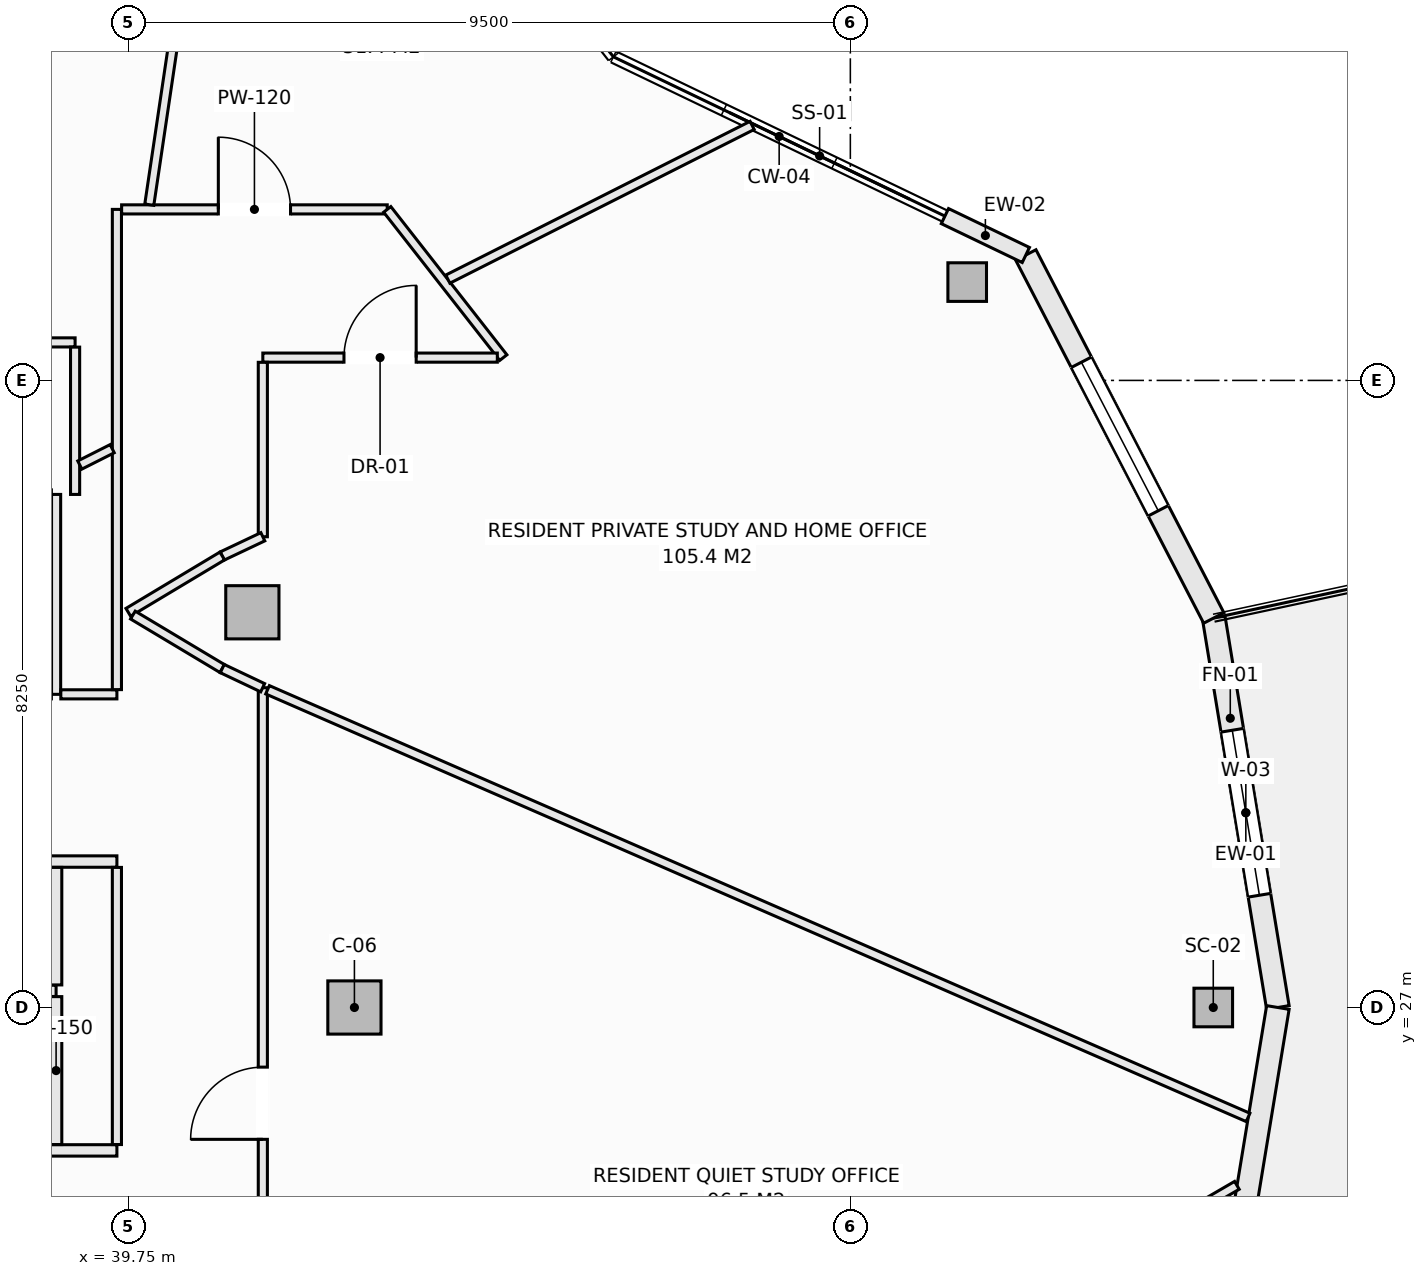
"""IFC4 building model, lengths in metres.
Left out: names, types, materials, properties, quantities, classifications, styles, units other than length and angle.
Written with IfcOpenShell. Run it as: python <this file> out.ifc"""

import sys

from ifc_helpers import new_model, si_unit, direction, frame, frame_2d, origin, origin_2d, place, context, subcontext, project, spatial, rectangle, hollow_rectangle, extrude, element, fill, save


model = new_model("IFC4")
c1 = context("Model", 3, precision=1e-05, world=origin(), true_north=direction((0.0, 1.0)))
c2 = subcontext(c1, "Body", "Model", "MODEL_VIEW")
j1 = project(units=[si_unit("LENGTHUNIT", "METRE"), si_unit("PLANEANGLEUNIT", "RADIAN")], contexts=[c1])
p1 = place(None, origin())
s1 = spatial("IfcSite", under=j1, at=p1, CompositionType="ELEMENT")
p2 = place(p1, origin())
s2 = spatial("IfcBuilding", under=s1, at=p2, CompositionType="ELEMENT")
p3 = place(p2, frame((0.0, 0.0, 226.1)))
s3 = spatial("IfcBuildingStorey", under=s2, at=p3, CompositionType="ELEMENT", Elevation=226.1)
for number, where, z_axis, x_axis in (
    (1, (54.025, 27.0, -0.27), (0.0, 0.0, 1.0), (1.0, 0.0, 0.0)),
    (2, (50.787, 36.544, -0.27), (0.0, 0.0, 1.0), (1.0, 0.0, 0.0)),
):
    element("IfcColumn", number, at=place(p3, frame(where, z_axis=z_axis, x_axis=x_axis)), inside=s3, PredefinedType="COLUMN", context=c2, shape_type="SweptSolid", body=[
        extrude(hollow_rectangle(XDim=0.508, YDim=0.508, WallThickness=0.019, at=origin_2d()), origin(), (0.0, 0.0, 1.0), 3.3),
    ])
for number, where, z_axis, x_axis in (
    (3, (42.725, 27.0, -0.27), (0.0, 0.0, 1.0), (1.0, 0.0, 0.0)),
    (4, (41.382, 32.199, -0.27), (0.0, 0.0, 1.0), (1.0, 0.0, 0.0)),
):
    element("IfcColumn", number, at=place(p3, frame(where, z_axis=z_axis, x_axis=x_axis)), inside=s3, PredefinedType="COLUMN", context=c2, shape_type="SweptSolid", body=[
        extrude(rectangle(XDim=0.7, YDim=0.7, at=origin_2d()), origin(), (0.0, 0.0, 1.0), 3.3),
    ])
p4 = place(p3, frame((54.032, 32.125, 0.0), z_axis=(0.0, 0.0, 1.0), x_axis=(0.16237087798, -0.986729799886, 0.0)))
e5 = element("IfcWall", 5, at=p4, inside=s3, PredefinedType="SOLIDWALL", context=c2, shape_type="SweptSolid", body=[
    extrude(rectangle(XDim=5.193, YDim=0.3, at=frame_2d((2.597, 0.0))), origin(), (0.0, 0.0, 1.0), 2.605),
])
p5 = place(p4, frame((1.497, 0.0, 0.72)))
e6 = element("IfcOpeningElement", 6, at=p5, cuts=e5, PredefinedType="OPENING", context=c2, shape_type="SweptSolid", body=[
    extrude(rectangle(XDim=2.2, YDim=1.65, at=frame_2d((1.1, 0.825))), frame((0.0, 0.16, 0.0), z_axis=(0.0, -1.0, 0.0), x_axis=(1.0, 0.0, 0.0)), (0.0, 0.0, 1.0), 0.32),
])
p6 = place(p3, frame((51.559, 36.9, 0.0), z_axis=(0.0, 0.0, 1.0), x_axis=(0.459808219482, -0.888018243786, 0.0)))
e7 = element("IfcWall", 7, at=p6, inside=s3, PredefinedType="SOLIDWALL", context=c2, shape_type="SweptSolid", body=[
    extrude(rectangle(XDim=5.378, YDim=0.3, at=frame_2d((2.689, 0.0))), origin(), (0.0, 0.0, 1.0), 2.605),
])
p7 = place(p6, frame((1.589, 0.0, 0.72)))
e8 = element("IfcOpeningElement", 8, at=p7, cuts=e7, PredefinedType="OPENING", context=c2, shape_type="SweptSolid", body=[
    extrude(rectangle(XDim=2.2, YDim=1.65, at=frame_2d((1.1, 0.825))), frame((0.0, 0.16, 0.0), z_axis=(0.0, -1.0, 0.0), x_axis=(1.0, 0.0, 0.0)), (0.0, 0.0, 1.0), 0.32),
])
p8 = place(p3, frame((50.494, 37.412, 0.0), z_axis=(0.0, 0.0, 1.0), x_axis=(0.901342408365, -0.433107218692, 0.0)))
e9 = element("IfcWall", 9, at=p8, inside=s3, PredefinedType="SOLIDWALL", context=c2, shape_type="SweptSolid", body=[
    extrude(rectangle(XDim=1.181, YDim=0.22, at=frame_2d((0.591, 0.0))), origin(), (0.0, 0.0, 1.0), 2.605),
])
p9 = place(p3, frame((54.032, 21.875, 0.0), z_axis=(0.0, 0.0, 1.0), x_axis=(0.16237087798, 0.986729799886, 0.0)))
e10 = element("IfcWall", 10, at=p9, inside=s3, PredefinedType="SOLIDWALL", context=c2, shape_type="SweptSolid", body=[
    extrude(rectangle(XDim=5.193, YDim=0.3, at=frame_2d((2.597, 0.0))), origin(), (0.0, 0.0, 1.0), 2.605),
])
p10 = place(p9, frame((0.5, 0.0, 0.0)))
e11 = element("IfcOpeningElement", 11, at=p10, cuts=e10, PredefinedType="OPENING", context=c2, shape_type="SweptSolid", body=[
    extrude(rectangle(XDim=1.2, YDim=2.2, at=frame_2d((0.6, 1.1))), frame((0.0, 0.16, 0.0), z_axis=(0.0, -1.0, 0.0), x_axis=(1.0, 0.0, 0.0)), (0.0, 0.0, 1.0), 0.32),
])
p11 = place(p3, frame((30.077, 28.92, 0.0), z_axis=(0.0, 0.0, 1.0), x_axis=(1.0, 0.0, 0.0)))
e12 = element("IfcWall", 12, at=p11, inside=s3, PredefinedType="PARTITIONING", context=c2, shape_type="SweptSolid", body=[
    extrude(rectangle(XDim=9.523, YDim=0.15, at=frame_2d((4.762, 0.0))), origin(), (0.0, 0.0, 1.0), 3.03),
])
p12 = place(p11, frame((1.342, 0.0, 0.0)))
e13 = element("IfcOpeningElement", 13, at=p12, cuts=e12, PredefinedType="OPENING", context=c2, shape_type="SweptSolid", body=[
    extrude(rectangle(XDim=0.95, YDim=2.1, at=frame_2d((0.475, 1.05))), frame((0.0, 0.085, 0.0), z_axis=(0.0, -1.0, 0.0), x_axis=(1.0, 0.0, 0.0)), (0.0, 0.0, 1.0), 0.17),
])
p13 = place(p11, frame((5.498, 0.0, 0.0)))
e14 = element("IfcOpeningElement", 14, at=p13, cuts=e12, PredefinedType="OPENING", context=c2, shape_type="SweptSolid", body=[
    extrude(rectangle(XDim=0.95, YDim=2.1, at=frame_2d((0.475, 1.05))), frame((0.0, 0.085, 0.0), z_axis=(0.0, -1.0, 0.0), x_axis=(1.0, 0.0, 0.0)), (0.0, 0.0, 1.0), 0.17),
])
p14 = place(p3, frame((33.377, 25.12, 0.0), z_axis=(0.0, 0.0, 1.0), x_axis=(1.0, 0.0, 0.0)))
e15 = element("IfcWall", 15, at=p14, inside=s3, PredefinedType="PARTITIONING", context=c2, shape_type="SweptSolid", body=[
    extrude(rectangle(XDim=6.223, YDim=0.15, at=frame_2d((3.112, 0.0))), origin(), (0.0, 0.0, 1.0), 3.03),
])
p15 = place(p14, frame((2.441, 0.0, 0.0)))
e16 = element("IfcOpeningElement", 16, at=p15, cuts=e15, PredefinedType="OPENING", context=c2, shape_type="SweptSolid", body=[
    extrude(rectangle(XDim=0.95, YDim=2.1, at=frame_2d((0.475, 1.05))), frame((0.0, 0.085, 0.0), z_axis=(0.0, -1.0, 0.0), x_axis=(1.0, 0.0, 0.0)), (0.0, 0.0, 1.0), 0.17),
])
p16 = place(p3, frame((33.377, 27.22, 0.0), z_axis=(0.0, 0.0, 1.0), x_axis=(1.0, 0.0, 0.0)))
e17 = element("IfcWall", 17, at=p16, inside=s3, PredefinedType="PARTITIONING", context=c2, shape_type="SweptSolid", body=[
    extrude(rectangle(XDim=5.423, YDim=0.15, at=frame_2d((2.711, 0.0))), origin(), (0.0, 0.0, 1.0), 3.03),
])
p17 = place(p3, frame((38.8, 25.197, 0.0), z_axis=(0.0, 0.0, 1.0), x_axis=(0.0, 1.0, 0.0)))
e18 = element("IfcWall", 18, at=p17, inside=s3, PredefinedType="PARTITIONING", context=c2, shape_type="SweptSolid", body=[
    extrude(rectangle(XDim=1.946, YDim=0.15, at=frame_2d((0.973, 0.0))), origin(), (0.0, 0.0, 1.0), 3.03),
])
p18 = place(p3, frame((38.8, 27.297, 0.0), z_axis=(0.0, 0.0, 1.0), x_axis=(0.0, 1.0, 0.0)))
e19 = element("IfcWall", 19, at=p18, inside=s3, PredefinedType="PARTITIONING", context=c2, shape_type="SweptSolid", body=[
    extrude(rectangle(XDim=1.546, YDim=0.15, at=frame_2d((0.773, 0.0))), origin(), (0.0, 0.0, 1.0), 3.03),
])
p19 = place(p3, frame((38.8, 31.12, 0.0), z_axis=(0.0, 0.0, 1.0), x_axis=(0.0, 1.0, 0.0)))
e20 = element("IfcWall", 20, at=p19, inside=s3, PredefinedType="PARTITIONING", context=c2, shape_type="SweptSolid", body=[
    extrude(rectangle(XDim=2.63, YDim=0.12, at=frame_2d((1.315, 0.0))), origin(), (0.0, 0.0, 1.0), 3.03),
])
p20 = place(p3, frame((38.862, 31.12, 0.0), z_axis=(0.0, 0.0, 1.0), x_axis=(1.0, 0.0, 0.0)))
e21 = element("IfcWall", 21, at=p20, inside=s3, PredefinedType="PARTITIONING", context=c2, shape_type="SweptSolid", body=[
    extrude(rectangle(XDim=0.738, YDim=0.12, at=frame_2d((0.369, 0.0))), origin(), (0.0, 0.0, 1.0), 3.03),
])
p21 = place(p3, frame((34.025, 35.75, 0.0), z_axis=(0.0, 0.0, 1.0), x_axis=(1.0, 0.0, 0.0)))
e22 = element("IfcWall", 22, at=p21, inside=s3, PredefinedType="PARTITIONING", context=c2, shape_type="SweptSolid", body=[
    extrude(rectangle(XDim=5.025, YDim=0.12, at=frame_2d((2.513, 0.0))), origin(), (0.0, 0.0, 1.0), 2.478),
])
p22 = place(p21, frame((1.617, 0.0, 0.0)))
e23 = element("IfcOpeningElement", 23, at=p22, cuts=e22, PredefinedType="OPENING", context=c2, shape_type="SweptSolid", body=[
    extrude(rectangle(XDim=0.95, YDim=2.1, at=frame_2d((0.475, 1.05))), frame((0.0, 0.07, 0.0), z_axis=(0.0, -1.0, 0.0), x_axis=(1.0, 0.0, 0.0)), (0.0, 0.0, 1.0), 0.14),
])
p23 = place(p3, frame((39.05, 33.75, 0.0), z_axis=(0.0, 0.0, 1.0), x_axis=(0.0, 1.0, 0.0)))
e24 = element("IfcWall", 24, at=p23, inside=s3, PredefinedType="PARTITIONING", context=c2, shape_type="SweptSolid", body=[
    extrude(rectangle(XDim=1.938, YDim=0.12, at=frame_2d((0.969, 0.0))), origin(), (0.0, 0.0, 1.0), 3.03),
])
p24 = place(p3, frame((39.6, 25.197, 0.0), z_axis=(0.0, 0.0, 1.0), x_axis=(0.0, 1.0, 0.0)))
e25 = element("IfcWall", 25, at=p24, inside=s3, PredefinedType="PARTITIONING", context=c2, shape_type="SweptSolid", body=[
    extrude(rectangle(XDim=3.646, YDim=0.12, at=frame_2d((1.823, 0.0))), origin(), (0.0, 0.0, 1.0), 3.03),
])
p25 = place(p3, frame((39.6, 31.182, 0.0), z_axis=(0.0, 0.0, 1.0), x_axis=(0.0, 1.0, 0.0)))
e26 = element("IfcWall", 26, at=p25, inside=s3, PredefinedType="PARTITIONING", context=c2, shape_type="SweptSolid", body=[
    extrude(rectangle(XDim=6.318, YDim=0.12, at=frame_2d((3.159, 0.0))), origin(), (0.0, 0.0, 1.0), 3.03),
])
p26 = place(p3, frame((39.662, 37.5, 0.0), z_axis=(0.0, 0.0, 1.0), x_axis=(1.0, 0.0, 0.0)))
e27 = element("IfcWall", 27, at=p26, inside=s3, PredefinedType="PARTITIONING", context=c2, shape_type="SweptSolid", body=[
    extrude(rectangle(XDim=3.495, YDim=0.12, at=frame_2d((1.748, 0.0))), origin(), (0.0, 0.0, 1.0), 2.77),
])
p27 = place(p26, frame((1.272, 0.0, 0.0)))
e28 = element("IfcOpeningElement", 28, at=p27, cuts=e27, PredefinedType="OPENING", context=c2, shape_type="SweptSolid", body=[
    extrude(rectangle(XDim=0.95, YDim=2.1, at=frame_2d((0.475, 1.05))), frame((0.0, 0.07, 0.0), z_axis=(0.0, -1.0, 0.0), x_axis=(1.0, 0.0, 0.0)), (0.0, 0.0, 1.0), 0.14),
])
p28 = place(p3, frame((43.157, 37.5, 0.0), z_axis=(0.0, 0.0, 1.0), x_axis=(0.616571357052, -0.78729902938, 0.0)))
e29 = element("IfcWall", 29, at=p28, inside=s3, PredefinedType="PARTITIONING", context=c2, shape_type="SweptSolid", body=[
    extrude(rectangle(XDim=2.477, YDim=0.12, at=frame_2d((1.238, 0.0))), origin(), (0.0, 0.0, 1.0), 3.03),
])
p29 = place(p3, frame((41.52, 35.55, 0.0), z_axis=(0.0, 0.0, 1.0), x_axis=(1.0, 0.0, 0.0)))
e30 = element("IfcWall", 30, at=p29, inside=s3, PredefinedType="PARTITIONING", context=c2, shape_type="SweptSolid", body=[
    extrude(rectangle(XDim=3.085, YDim=0.12, at=frame_2d((1.542, 0.0))), origin(), (0.0, 0.0, 1.0), 3.03),
])
p30 = place(p29, frame((1.068, 0.0, 0.0)))
e31 = element("IfcOpeningElement", 31, at=p30, cuts=e30, PredefinedType="OPENING", context=c2, shape_type="SweptSolid", body=[
    extrude(rectangle(XDim=0.95, YDim=2.1, at=frame_2d((0.475, 1.05))), frame((0.0, 0.07, 0.0), z_axis=(0.0, -1.0, 0.0), x_axis=(1.0, 0.0, 0.0)), (0.0, 0.0, 1.0), 0.14),
])
p31 = place(p3, frame((41.52, 22.794, 0.0), z_axis=(0.0, 0.0, 1.0), x_axis=(0.0, 1.0, 0.0)))
e32 = element("IfcWall", 32, at=p31, inside=s3, PredefinedType="PARTITIONING", context=c2, shape_type="SweptSolid", body=[
    extrude(rectangle(XDim=8.413, YDim=0.12, at=frame_2d((4.207, 0.0))), origin(), (0.0, 0.0, 1.0), 2.478),
])
p32 = place(p31, frame((2.471, 0.0, 0.0)))
e33 = element("IfcOpeningElement", 33, at=p32, cuts=e32, PredefinedType="OPENING", context=c2, shape_type="SweptSolid", body=[
    extrude(rectangle(XDim=0.95, YDim=2.1, at=frame_2d((0.475, 1.05))), frame((0.0, 0.07, 0.0), z_axis=(0.0, -1.0, 0.0), x_axis=(1.0, 0.0, 0.0)), (0.0, 0.0, 1.0), 0.14),
])
p33 = place(p3, frame((41.52, 33.193, 0.0), z_axis=(0.0, 0.0, 1.0), x_axis=(0.0, 1.0, 0.0)))
e34 = element("IfcWall", 34, at=p33, inside=s3, PredefinedType="PARTITIONING", context=c2, shape_type="SweptSolid", body=[
    extrude(rectangle(XDim=2.295, YDim=0.12, at=frame_2d((1.147, 0.0))), origin(), (0.0, 0.0, 1.0), 3.03),
])
p34 = place(p3, frame((40.986, 32.94, 0.0), z_axis=(0.0, 0.0, 1.0), x_axis=(0.90356951601, 0.428441512621, 0.0)))
e35 = element("IfcWall", 35, at=p34, inside=s3, PredefinedType="PARTITIONING", context=c2, shape_type="SweptSolid", body=[
    extrude(rectangle(XDim=0.591, YDim=0.12, at=frame_2d((0.295, 0.0))), origin(), (0.0, 0.0, 1.0), 3.03),
])
p35 = place(p3, frame((39.75, 32.199, 0.0), z_axis=(0.0, 0.0, 1.0), x_axis=(0.857702120906, 0.514146935996, 0.0)))
e36 = element("IfcWall", 36, at=p35, inside=s3, PredefinedType="PARTITIONING", context=c2, shape_type="SweptSolid", body=[
    extrude(rectangle(XDim=1.441, YDim=0.12, at=frame_2d((0.721, 0.0))), origin(), (0.0, 0.0, 1.0), 3.03),
])
p36 = place(p3, frame((39.81, 32.163, 0.0), z_axis=(0.0, 0.0, 1.0), x_axis=(0.858011245414, -0.513630901273, 0.0)))
e37 = element("IfcWall", 37, at=p36, inside=s3, PredefinedType="PARTITIONING", context=c2, shape_type="SweptSolid", body=[
    extrude(rectangle(XDim=1.37, YDim=0.12, at=frame_2d((0.685, 0.0))), origin(), (0.0, 0.0, 1.0), 3.03),
])
p37 = place(p3, frame((40.986, 31.459, 0.0), z_axis=(0.0, 0.0, 1.0), x_axis=(0.903687141457, -0.428193356283, 0.0)))
e38 = element("IfcWall", 38, at=p37, inside=s3, PredefinedType="PARTITIONING", context=c2, shape_type="SweptSolid", body=[
    extrude(rectangle(XDim=0.588, YDim=0.12, at=frame_2d((0.294, 0.0))), origin(), (0.0, 0.0, 1.0), 3.03),
])
p38 = place(p3, frame((43.773, 18.512, 0.0), z_axis=(0.0, 0.0, 1.0), x_axis=(0.864261022419, 0.503043621495, 0.0)))
e39 = element("IfcWall", 39, at=p38, inside=s3, PredefinedType="PARTITIONING", context=c2, shape_type="SweptSolid", body=[
    extrude(rectangle(XDim=12.222, YDim=0.12, at=frame_2d((6.111, 0.0))), origin(), (0.0, 0.0, 1.0), 3.03),
])
p39 = place(p3, frame((41.582, 31.18, 0.0), z_axis=(0.0, 0.0, 1.0), x_axis=(0.916624100851, -0.399750244202, 0.0)))
e40 = element("IfcWall", 40, at=p39, inside=s3, PredefinedType="PARTITIONING", context=c2, shape_type="SweptSolid", body=[
    extrude(rectangle(XDim=14.074, YDim=0.12, at=frame_2d((7.037, 0.0))), origin(), (0.0, 0.0, 1.0), 2.478),
])
p40 = place(p3, frame((39.112, 34.137, 0.0), z_axis=(0.0, 0.0, 1.0), x_axis=(0.892681104984, 0.450688855869, 0.0)))
e41 = element("IfcWall", 41, at=p40, inside=s3, PredefinedType="PARTITIONING", context=c2, shape_type="SweptSolid", body=[
    extrude(rectangle(XDim=0.477, YDim=0.12, at=frame_2d((0.239, 0.0))), origin(), (0.0, 0.0, 1.0), 3.03),
])
p41 = place(p3, frame((43.954, 36.583, 0.0), z_axis=(0.0, 0.0, 1.0), x_axis=(0.892601830049, 0.450845841716, 0.0)))
e42 = element("IfcWall", 42, at=p41, inside=s3, PredefinedType="PARTITIONING", context=c2, shape_type="SweptSolid", body=[
    extrude(rectangle(XDim=4.485, YDim=0.12, at=frame_2d((2.243, 0.0))), origin(), (0.0, 0.0, 1.0), 3.03),
])
p42 = place(p3, frame((40.026, 37.562, 0.0), z_axis=(0.0, 0.0, 1.0), x_axis=(0.147138038827, 0.989115967685, 0.0)))
e43 = element("IfcWall", 43, at=p42, inside=s3, PredefinedType="PARTITIONING", context=c2, shape_type="SweptSolid", body=[
    extrude(rectangle(XDim=6.98, YDim=0.12, at=frame_2d((3.49, 0.0))), origin(), (0.0, 0.0, 1.0), 2.478),
])
p43 = place(p5, origin())
e44 = element("IfcWindow", 44, at=p43, inside=s3, PartitioningType="SINGLE_PANEL", PredefinedType="WINDOW", context=c2, shape_type="SweptSolid", body=[
    extrude(rectangle(XDim=2.2, YDim=1.65, at=frame_2d((1.1, 0.825))), frame((0.0, 0.03, 0.0), z_axis=(0.0, -1.0, 0.0), x_axis=(1.0, 0.0, 0.0)), (0.0, 0.0, 1.0), 0.06),
])
fill(e6, e44)
p44 = place(p7, origin())
e45 = element("IfcWindow", 45, at=p44, inside=s3, PartitioningType="SINGLE_PANEL", PredefinedType="WINDOW", context=c2, shape_type="SweptSolid", body=[
    extrude(rectangle(XDim=2.2, YDim=1.65, at=frame_2d((1.1, 0.825))), frame((0.0, 0.03, 0.0), z_axis=(0.0, -1.0, 0.0), x_axis=(1.0, 0.0, 0.0)), (0.0, 0.0, 1.0), 0.06),
])
fill(e8, e45)
p45 = place(p32, origin())
e46 = element("IfcDoor", 46, at=p45, inside=s3, OperationType="SINGLE_SWING_LEFT", PredefinedType="DOOR", context=c2, shape_type="SweptSolid", body=[
    extrude(rectangle(XDim=0.95, YDim=2.1, at=frame_2d((0.475, 1.05))), frame((0.0, 0.025, 0.0), z_axis=(0.0, -1.0, 0.0), x_axis=(1.0, 0.0, 0.0)), (0.0, 0.0, 1.0), 0.05),
])
fill(e33, e46)
p46 = place(p30, origin())
e47 = element("IfcDoor", 47, at=p46, inside=s3, OperationType="SINGLE_SWING_RIGHT", PredefinedType="DOOR", context=c2, shape_type="SweptSolid", body=[
    extrude(rectangle(XDim=0.95, YDim=2.1, at=frame_2d((0.475, 1.05))), frame((0.0, 0.025, 0.0), z_axis=(0.0, -1.0, 0.0), x_axis=(1.0, 0.0, 0.0)), (0.0, 0.0, 1.0), 0.05),
])
fill(e31, e47)
p47 = place(p27, origin())
e48 = element("IfcDoor", 48, at=p47, inside=s3, OperationType="SINGLE_SWING_LEFT", PredefinedType="DOOR", context=c2, shape_type="SweptSolid", body=[
    extrude(rectangle(XDim=0.95, YDim=2.1, at=frame_2d((0.475, 1.05))), frame((0.0, 0.025, 0.0), z_axis=(0.0, -1.0, 0.0), x_axis=(1.0, 0.0, 0.0)), (0.0, 0.0, 1.0), 0.05),
])
fill(e28, e48)
save(model, sys.argv[1])
